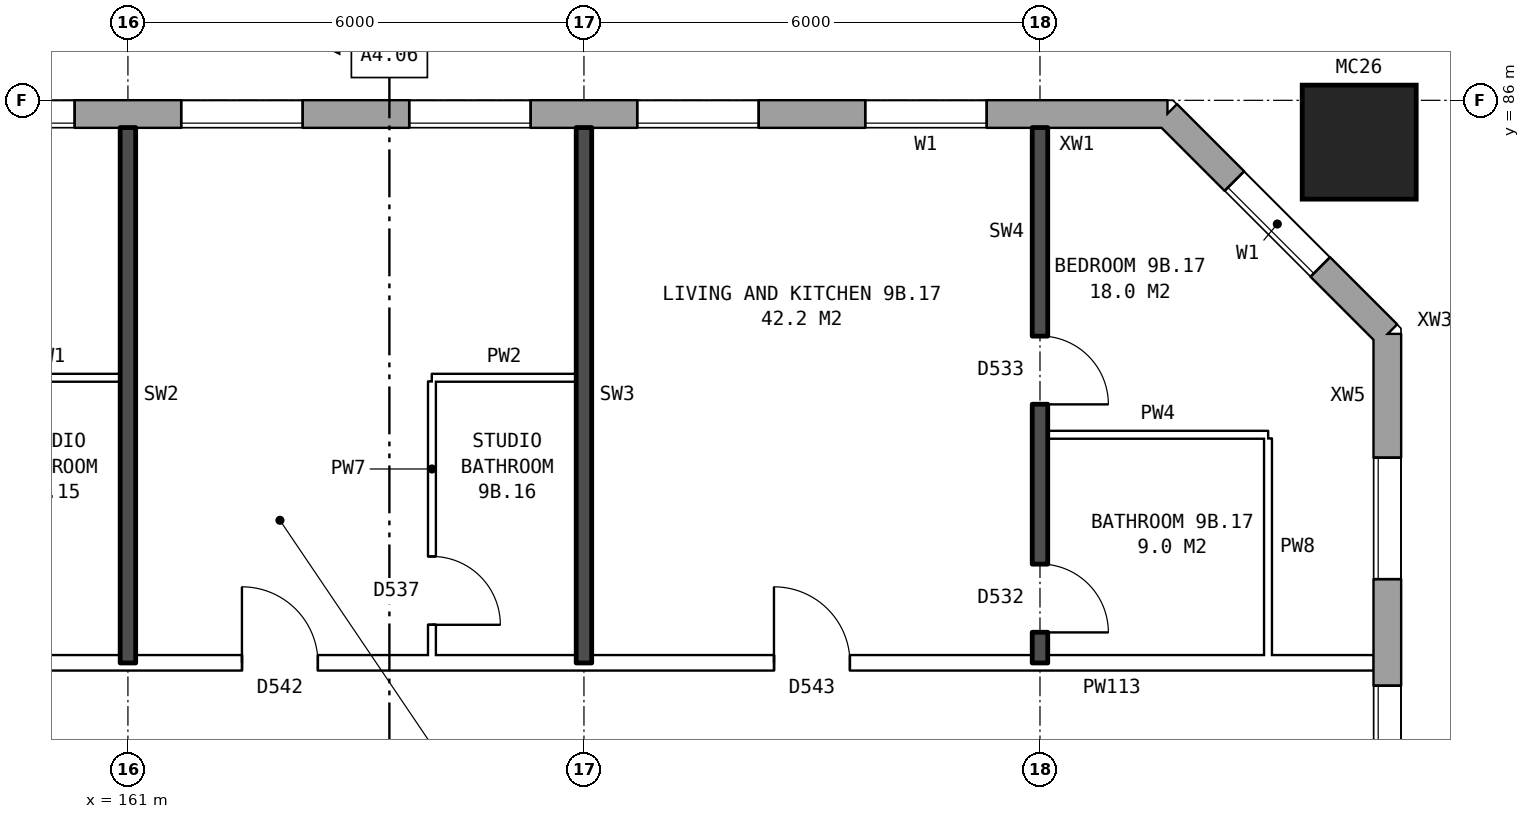
"""IFC4 building model, lengths in metres.
Left out: names, types, materials, properties, quantities, classifications, styles, units other than length and angle.
Written with IfcOpenShell. Run it as: python <this file> out.ifc"""

import sys

from ifc_helpers import new_model, si_unit, direction, frame, frame_2d, origin, origin_2d, place, context, subcontext, project, spatial, rectangle, hollow_rectangle, extrude, element, fill, save


model = new_model("IFC4")
c1 = context("Model", 3, precision=1e-05, world=origin(), true_north=direction((0.0, 1.0)))
c2 = subcontext(c1, "Body", "Model", "MODEL_VIEW")
j1 = project(units=[si_unit("LENGTHUNIT", "METRE"), si_unit("PLANEANGLEUNIT", "RADIAN")], contexts=[c1])
p1 = place(None, origin())
s1 = spatial("IfcSite", under=j1, at=p1, CompositionType="ELEMENT")
p2 = place(p1, origin())
s2 = spatial("IfcBuilding", under=s1, at=p2, CompositionType="ELEMENT")
p3 = place(p2, frame((0.0, 0.0, 35.0)))
s3 = spatial("IfcBuildingStorey", under=s2, at=p3, CompositionType="ELEMENT", Elevation=35.0)
p4 = place(p3, frame((177.2, 85.45, 0.0), z_axis=(0.0, 0.0, 1.0), x_axis=(1.0, 0.0, 0.0)))
e1 = element("IfcColumn", 1, at=p4, inside=s3, PredefinedType="COLUMN", context=c2, shape_type="SweptSolid", body=[
    extrude(hollow_rectangle(XDim=1.5, YDim=1.5, WallThickness=0.08, at=origin_2d()), origin(), (0.0, 0.0, 1.0), 3.1),
])
p5 = place(p3, frame((177.57, 57.075, 0.0), z_axis=(0.0, 0.0, 1.0), x_axis=(0.0, 1.0, 0.0)))
e2 = element("IfcWall", 2, at=p5, inside=s3, PredefinedType="STANDARD", context=c2, shape_type="SweptSolid", body=[
    extrude(rectangle(XDim=25.851, YDim=0.36, at=frame_2d((12.925, 0.0))), origin(), (0.0, 0.0, 1.0), 2.85),
])
p6 = place(p5, frame((1.625, 0.0, 0.8)))
e3 = element("IfcOpeningElement", 3, at=p6, cuts=e2, PredefinedType="OPENING", context=c2, shape_type="SweptSolid", body=[
    extrude(rectangle(XDim=1.6, YDim=1.8, at=frame_2d((0.8, 0.9))), frame((0.0, 0.19, 0.0), z_axis=(0.0, -1.0, 0.0), x_axis=(1.0, 0.0, 0.0)), (0.0, 0.0, 1.0), 0.38),
])
p7 = place(p5, frame((4.625, 0.0, 0.8)))
e4 = element("IfcOpeningElement", 4, at=p7, cuts=e2, PredefinedType="OPENING", context=c2, shape_type="SweptSolid", body=[
    extrude(rectangle(XDim=1.6, YDim=1.8, at=frame_2d((0.8, 0.9))), frame((0.0, 0.19, 0.0), z_axis=(0.0, -1.0, 0.0), x_axis=(1.0, 0.0, 0.0)), (0.0, 0.0, 1.0), 0.38),
])
p8 = place(p5, frame((7.625, 0.0, 0.8)))
e5 = element("IfcOpeningElement", 5, at=p8, cuts=e2, PredefinedType="OPENING", context=c2, shape_type="SweptSolid", body=[
    extrude(rectangle(XDim=1.6, YDim=1.8, at=frame_2d((0.8, 0.9))), frame((0.0, 0.19, 0.0), z_axis=(0.0, -1.0, 0.0), x_axis=(1.0, 0.0, 0.0)), (0.0, 0.0, 1.0), 0.38),
])
p9 = place(p5, frame((10.625, 0.0, 0.8)))
e6 = element("IfcOpeningElement", 6, at=p9, cuts=e2, PredefinedType="OPENING", context=c2, shape_type="SweptSolid", body=[
    extrude(rectangle(XDim=1.6, YDim=1.8, at=frame_2d((0.8, 0.9))), frame((0.0, 0.19, 0.0), z_axis=(0.0, -1.0, 0.0), x_axis=(1.0, 0.0, 0.0)), (0.0, 0.0, 1.0), 0.38),
])
p10 = place(p5, frame((13.625, 0.0, 0.8)))
e7 = element("IfcOpeningElement", 7, at=p10, cuts=e2, PredefinedType="OPENING", context=c2, shape_type="SweptSolid", body=[
    extrude(rectangle(XDim=1.6, YDim=1.8, at=frame_2d((0.8, 0.9))), frame((0.0, 0.19, 0.0), z_axis=(0.0, -1.0, 0.0), x_axis=(1.0, 0.0, 0.0)), (0.0, 0.0, 1.0), 0.38),
])
p11 = place(p5, frame((16.625, 0.0, 0.8)))
e8 = element("IfcOpeningElement", 8, at=p11, cuts=e2, PredefinedType="OPENING", context=c2, shape_type="SweptSolid", body=[
    extrude(rectangle(XDim=1.6, YDim=1.8, at=frame_2d((0.8, 0.9))), frame((0.0, 0.19, 0.0), z_axis=(0.0, -1.0, 0.0), x_axis=(1.0, 0.0, 0.0)), (0.0, 0.0, 1.0), 0.38),
])
p12 = place(p5, frame((19.625, 0.0, 0.8)))
e9 = element("IfcOpeningElement", 9, at=p12, cuts=e2, PredefinedType="OPENING", context=c2, shape_type="SweptSolid", body=[
    extrude(rectangle(XDim=1.6, YDim=1.8, at=frame_2d((0.8, 0.9))), frame((0.0, 0.19, 0.0), z_axis=(0.0, -1.0, 0.0), x_axis=(1.0, 0.0, 0.0)), (0.0, 0.0, 1.0), 0.38),
])
p13 = place(p5, frame((22.625, 0.0, 0.8)))
e10 = element("IfcOpeningElement", 10, at=p13, cuts=e2, PredefinedType="OPENING", context=c2, shape_type="SweptSolid", body=[
    extrude(rectangle(XDim=1.6, YDim=1.8, at=frame_2d((0.8, 0.9))), frame((0.0, 0.19, 0.0), z_axis=(0.0, -1.0, 0.0), x_axis=(1.0, 0.0, 0.0)), (0.0, 0.0, 1.0), 0.38),
])
p14 = place(p3, frame((177.57, 82.925, 0.0), z_axis=(0.0, 0.0, 1.0), x_axis=(-0.707106781187, 0.707106781187, 0.0)))
e11 = element("IfcWall", 11, at=p14, inside=s3, PredefinedType="STANDARD", context=c2, shape_type="SweptSolid", body=[
    extrude(rectangle(XDim=4.094, YDim=0.36, at=frame_2d((2.047, 0.0))), origin(), (0.0, 0.0, 1.0), 2.85),
])
p15 = place(p14, frame((1.247, 0.0, 0.8)))
e12 = element("IfcOpeningElement", 12, at=p15, cuts=e11, PredefinedType="OPENING", context=c2, shape_type="SweptSolid", body=[
    extrude(rectangle(XDim=1.6, YDim=1.8, at=frame_2d((0.8, 0.9))), frame((0.0, 0.19, 0.0), z_axis=(0.0, -1.0, 0.0), x_axis=(1.0, 0.0, 0.0)), (0.0, 0.0, 1.0), 0.38),
])
p16 = place(p3, frame((174.675, 85.82, 0.0), z_axis=(0.0, 0.0, 1.0), x_axis=(-1.0, 0.0, 0.0)))
e13 = element("IfcWall", 13, at=p16, inside=s3, PredefinedType="STANDARD", context=c2, shape_type="SweptSolid", body=[
    extrude(rectangle(XDim=40.601, YDim=0.36, at=frame_2d((20.3, 0.0))), origin(), (0.0, 0.0, 1.0), 2.85),
])
p17 = place(p16, frame((2.375, 0.0, 0.8)))
e14 = element("IfcOpeningElement", 14, at=p17, cuts=e13, PredefinedType="OPENING", context=c2, shape_type="SweptSolid", body=[
    extrude(rectangle(XDim=1.6, YDim=1.8, at=frame_2d((0.8, 0.9))), frame((0.0, 0.19, 0.0), z_axis=(0.0, -1.0, 0.0), x_axis=(1.0, 0.0, 0.0)), (0.0, 0.0, 1.0), 0.38),
])
p18 = place(p16, frame((5.375, 0.0, 0.8)))
e15 = element("IfcOpeningElement", 15, at=p18, cuts=e13, PredefinedType="OPENING", context=c2, shape_type="SweptSolid", body=[
    extrude(rectangle(XDim=1.6, YDim=1.8, at=frame_2d((0.8, 0.9))), frame((0.0, 0.19, 0.0), z_axis=(0.0, -1.0, 0.0), x_axis=(1.0, 0.0, 0.0)), (0.0, 0.0, 1.0), 0.38),
])
p19 = place(p16, frame((8.375, 0.0, 0.8)))
e16 = element("IfcOpeningElement", 16, at=p19, cuts=e13, PredefinedType="OPENING", context=c2, shape_type="SweptSolid", body=[
    extrude(rectangle(XDim=1.6, YDim=1.8, at=frame_2d((0.8, 0.9))), frame((0.0, 0.19, 0.0), z_axis=(0.0, -1.0, 0.0), x_axis=(1.0, 0.0, 0.0)), (0.0, 0.0, 1.0), 0.38),
])
p20 = place(p16, frame((11.375, 0.0, 0.8)))
e17 = element("IfcOpeningElement", 17, at=p20, cuts=e13, PredefinedType="OPENING", context=c2, shape_type="SweptSolid", body=[
    extrude(rectangle(XDim=1.6, YDim=1.8, at=frame_2d((0.8, 0.9))), frame((0.0, 0.19, 0.0), z_axis=(0.0, -1.0, 0.0), x_axis=(1.0, 0.0, 0.0)), (0.0, 0.0, 1.0), 0.38),
])
p21 = place(p16, frame((14.375, 0.0, 0.8)))
e18 = element("IfcOpeningElement", 18, at=p21, cuts=e13, PredefinedType="OPENING", context=c2, shape_type="SweptSolid", body=[
    extrude(rectangle(XDim=1.6, YDim=1.8, at=frame_2d((0.8, 0.9))), frame((0.0, 0.19, 0.0), z_axis=(0.0, -1.0, 0.0), x_axis=(1.0, 0.0, 0.0)), (0.0, 0.0, 1.0), 0.38),
])
p22 = place(p16, frame((16.275, 0.0, 0.8)))
e19 = element("IfcOpeningElement", 19, at=p22, cuts=e13, PredefinedType="OPENING", context=c2, shape_type="SweptSolid", body=[
    extrude(rectangle(XDim=1.0, YDim=1.8, at=frame_2d((0.5, 0.9))), frame((0.0, 0.19, 0.0), z_axis=(0.0, -1.0, 0.0), x_axis=(1.0, 0.0, 0.0)), (0.0, 0.0, 1.0), 0.38),
])
p23 = place(p16, frame((19.975, 0.0, 0.15)))
e20 = element("IfcOpeningElement", 20, at=p23, cuts=e13, PredefinedType="OPENING", context=c2, shape_type="SweptSolid", body=[
    extrude(rectangle(XDim=0.6, YDim=1.8, at=frame_2d((0.3, 0.9))), frame((0.0, 0.19, 0.0), z_axis=(0.0, -1.0, 0.0), x_axis=(1.0, 0.0, 0.0)), (0.0, 0.0, 1.0), 0.38),
])
p24 = place(p16, frame((23.375, 0.0, 0.8)))
e21 = element("IfcOpeningElement", 21, at=p24, cuts=e13, PredefinedType="OPENING", context=c2, shape_type="SweptSolid", body=[
    extrude(rectangle(XDim=1.6, YDim=1.8, at=frame_2d((0.8, 0.9))), frame((0.0, 0.19, 0.0), z_axis=(0.0, -1.0, 0.0), x_axis=(1.0, 0.0, 0.0)), (0.0, 0.0, 1.0), 0.38),
])
p25 = place(p16, frame((26.375, 0.0, 0.8)))
e22 = element("IfcOpeningElement", 22, at=p25, cuts=e13, PredefinedType="OPENING", context=c2, shape_type="SweptSolid", body=[
    extrude(rectangle(XDim=1.6, YDim=1.8, at=frame_2d((0.8, 0.9))), frame((0.0, 0.19, 0.0), z_axis=(0.0, -1.0, 0.0), x_axis=(1.0, 0.0, 0.0)), (0.0, 0.0, 1.0), 0.38),
])
p26 = place(p16, frame((29.375, 0.0, 0.8)))
e23 = element("IfcOpeningElement", 23, at=p26, cuts=e13, PredefinedType="OPENING", context=c2, shape_type="SweptSolid", body=[
    extrude(rectangle(XDim=1.6, YDim=1.8, at=frame_2d((0.8, 0.9))), frame((0.0, 0.19, 0.0), z_axis=(0.0, -1.0, 0.0), x_axis=(1.0, 0.0, 0.0)), (0.0, 0.0, 1.0), 0.38),
])
p27 = place(p16, frame((32.375, 0.0, 0.8)))
e24 = element("IfcOpeningElement", 24, at=p27, cuts=e13, PredefinedType="OPENING", context=c2, shape_type="SweptSolid", body=[
    extrude(rectangle(XDim=1.6, YDim=1.8, at=frame_2d((0.8, 0.9))), frame((0.0, 0.19, 0.0), z_axis=(0.0, -1.0, 0.0), x_axis=(1.0, 0.0, 0.0)), (0.0, 0.0, 1.0), 0.38),
])
p28 = place(p16, frame((35.375, 0.0, 0.8)))
e25 = element("IfcOpeningElement", 25, at=p28, cuts=e13, PredefinedType="OPENING", context=c2, shape_type="SweptSolid", body=[
    extrude(rectangle(XDim=1.6, YDim=1.8, at=frame_2d((0.8, 0.9))), frame((0.0, 0.19, 0.0), z_axis=(0.0, -1.0, 0.0), x_axis=(1.0, 0.0, 0.0)), (0.0, 0.0, 1.0), 0.38),
])
p29 = place(p16, frame((38.375, 0.0, 0.8)))
e26 = element("IfcOpeningElement", 26, at=p29, cuts=e13, PredefinedType="OPENING", context=c2, shape_type="SweptSolid", body=[
    extrude(rectangle(XDim=1.6, YDim=1.8, at=frame_2d((0.8, 0.9))), frame((0.0, 0.19, 0.0), z_axis=(0.0, -1.0, 0.0), x_axis=(1.0, 0.0, 0.0)), (0.0, 0.0, 1.0), 0.38),
])
p30 = place(p16, frame((17.575, 0.0, 1.7)))
e27 = element("IfcOpeningElement", 27, at=p30, cuts=e13, PredefinedType="OPENING", context=c2, shape_type="SweptSolid", body=[
    extrude(rectangle(XDim=0.8, YDim=0.9, at=frame_2d((0.4, 0.45))), frame((0.0, 0.19, 0.0), z_axis=(0.0, -1.0, 0.0), x_axis=(1.0, 0.0, 0.0)), (0.0, 0.0, 1.0), 0.38),
])
p31 = place(p16, frame((20.875, 0.0, 0.15)))
e28 = element("IfcOpeningElement", 28, at=p31, cuts=e13, PredefinedType="OPENING", context=c2, shape_type="SweptSolid", body=[
    extrude(rectangle(XDim=0.8, YDim=0.9, at=frame_2d((0.4, 0.45))), frame((0.0, 0.19, 0.0), z_axis=(0.0, -1.0, 0.0), x_axis=(1.0, 0.0, 0.0)), (0.0, 0.0, 1.0), 0.38),
])
p32 = place(p3, frame((155.1, 78.6, 0.0), z_axis=(0.0, 0.0, 1.0), x_axis=(1.0, 0.0, 0.0)))
e29 = element("IfcWall", 29, at=p32, inside=s3, PredefinedType="PARTITIONING", context=c2, shape_type="SweptSolid", body=[
    extrude(rectangle(XDim=22.29, YDim=0.2, at=frame_2d((11.145, 0.0))), origin(), (0.0, 0.0, 1.0), 2.85),
])
p33 = place(p32, frame((1.45, 0.0, 0.0)))
e30 = element("IfcOpeningElement", 30, at=p33, cuts=e29, PredefinedType="OPENING", context=c2, shape_type="SweptSolid", body=[
    extrude(rectangle(XDim=1.0, YDim=2.1, at=frame_2d((0.5, 1.05))), frame((0.0, 0.11, 0.0), z_axis=(0.0, -1.0, 0.0), x_axis=(1.0, 0.0, 0.0)), (0.0, 0.0, 1.0), 0.22),
])
p34 = place(p32, frame((7.4, 0.0, 0.0)))
e31 = element("IfcOpeningElement", 31, at=p34, cuts=e29, PredefinedType="OPENING", context=c2, shape_type="SweptSolid", body=[
    extrude(rectangle(XDim=1.0, YDim=2.1, at=frame_2d((0.5, 1.05))), frame((0.0, 0.11, 0.0), z_axis=(0.0, -1.0, 0.0), x_axis=(1.0, 0.0, 0.0)), (0.0, 0.0, 1.0), 0.22),
])
p35 = place(p32, frame((14.4, 0.0, 0.0)))
e32 = element("IfcOpeningElement", 32, at=p35, cuts=e29, PredefinedType="OPENING", context=c2, shape_type="SweptSolid", body=[
    extrude(rectangle(XDim=1.0, YDim=2.1, at=frame_2d((0.5, 1.05))), frame((0.0, 0.11, 0.0), z_axis=(0.0, -1.0, 0.0), x_axis=(1.0, 0.0, 0.0)), (0.0, 0.0, 1.0), 0.22),
])
p36 = place(p3, frame((173.1, 81.6, 0.0), z_axis=(0.0, 0.0, 1.0), x_axis=(1.0, 0.0, 0.0)))
e33 = element("IfcWall", 33, at=p36, inside=s3, PredefinedType="PARTITIONING", context=c2, shape_type="SweptSolid", body=[
    extrude(rectangle(XDim=2.9, YDim=0.1, at=frame_2d((1.45, 0.0))), origin(), (0.0, 0.0, 1.0), 2.85),
])
for number, where, z_axis, x_axis in (
    (34, (159.0, 82.35, 0.0), (0.0, 0.0, 1.0), (1.0, 0.0, 0.0)),
    (35, (165.0, 82.35, 0.0), (0.0, 0.0, 1.0), (1.0, 0.0, 0.0)),
):
    element("IfcWall", number, at=place(p3, frame(where, z_axis=z_axis, x_axis=x_axis)), inside=s3, PredefinedType="PARTITIONING", context=c2, shape_type="SweptSolid", body=[
        extrude(rectangle(XDim=1.9, YDim=0.1, at=frame_2d((0.95, 0.0))), origin(), (0.0, 0.0, 1.0), 2.85),
    ])
p37 = place(p3, frame((161.0, 78.6, 0.0), z_axis=(0.0, 0.0, 1.0), x_axis=(0.0, 1.0, 0.0)))
e36 = element("IfcWall", 36, at=p37, inside=s3, PredefinedType="SOLIDWALL", context=c2, shape_type="SweptSolid", body=[
    extrude(rectangle(XDim=7.04, YDim=0.2, at=frame_2d((3.52, 0.0))), origin(), (0.0, 0.0, 1.0), 2.85),
])
p38 = place(p3, frame((165.0, 78.7, 0.0), z_axis=(0.0, 0.0, 1.0), x_axis=(0.0, 1.0, 0.0)))
e37 = element("IfcWall", 37, at=p38, inside=s3, PredefinedType="PARTITIONING", context=c2, shape_type="SweptSolid", body=[
    extrude(rectangle(XDim=3.6, YDim=0.1, at=frame_2d((1.8, 0.0))), origin(), (0.0, 0.0, 1.0), 2.85),
])
p39 = place(p38, frame((0.4, 0.0, 0.0)))
e38 = element("IfcOpeningElement", 38, at=p39, cuts=e37, PredefinedType="OPENING", context=c2, shape_type="SweptSolid", body=[
    extrude(rectangle(XDim=0.9, YDim=2.1, at=frame_2d((0.45, 1.05))), frame((0.0, 0.06, 0.0), z_axis=(0.0, -1.0, 0.0), x_axis=(1.0, 0.0, 0.0)), (0.0, 0.0, 1.0), 0.12),
])
p40 = place(p3, frame((167.0, 78.6, 0.0), z_axis=(0.0, 0.0, 1.0), x_axis=(0.0, 1.0, 0.0)))
e39 = element("IfcWall", 39, at=p40, inside=s3, PredefinedType="SOLIDWALL", context=c2, shape_type="SweptSolid", body=[
    extrude(rectangle(XDim=7.04, YDim=0.2, at=frame_2d((3.52, 0.0))), origin(), (0.0, 0.0, 1.0), 2.85),
])
p41 = place(p3, frame((173.0, 78.6, 0.0), z_axis=(0.0, 0.0, 1.0), x_axis=(0.0, 1.0, 0.0)))
e40 = element("IfcWall", 40, at=p41, inside=s3, PredefinedType="SOLIDWALL", context=c2, shape_type="SweptSolid", body=[
    extrude(rectangle(XDim=7.04, YDim=0.2, at=frame_2d((3.52, 0.0))), origin(), (0.0, 0.0, 1.0), 2.85),
])
p42 = place(p41, frame((3.4, 0.0, 0.0)))
e41 = element("IfcOpeningElement", 41, at=p42, cuts=e40, PredefinedType="OPENING", context=c2, shape_type="SweptSolid", body=[
    extrude(rectangle(XDim=0.9, YDim=2.1, at=frame_2d((0.45, 1.05))), frame((0.0, 0.11, 0.0), z_axis=(0.0, -1.0, 0.0), x_axis=(1.0, 0.0, 0.0)), (0.0, 0.0, 1.0), 0.22),
])
p43 = place(p41, frame((0.4, 0.0, 0.0)))
e42 = element("IfcOpeningElement", 42, at=p43, cuts=e40, PredefinedType="OPENING", context=c2, shape_type="SweptSolid", body=[
    extrude(rectangle(XDim=0.9, YDim=2.1, at=frame_2d((0.45, 1.05))), frame((0.0, 0.11, 0.0), z_axis=(0.0, -1.0, 0.0), x_axis=(1.0, 0.0, 0.0)), (0.0, 0.0, 1.0), 0.22),
])
p44 = place(p3, frame((176.0, 78.7, 0.0), z_axis=(0.0, 0.0, 1.0), x_axis=(0.0, 1.0, 0.0)))
e43 = element("IfcWall", 43, at=p44, inside=s3, PredefinedType="PARTITIONING", context=c2, shape_type="SweptSolid", body=[
    extrude(rectangle(XDim=2.85, YDim=0.1, at=frame_2d((1.425, 0.0))), origin(), (0.0, 0.0, 1.0), 2.85),
])
p45 = place(p12, origin())
e44 = element("IfcWindow", 44, at=p45, inside=s3, PartitioningType="SINGLE_PANEL", PredefinedType="WINDOW", context=c2, shape_type="SweptSolid", body=[
    extrude(rectangle(XDim=1.6, YDim=1.8, at=frame_2d((0.8, 0.9))), frame((0.0, 0.15, 0.0), z_axis=(0.0, -1.0, 0.0), x_axis=(1.0, 0.0, 0.0)), (0.0, 0.0, 1.0), 0.06),
])
fill(e9, e44)
p46 = place(p13, origin())
e45 = element("IfcWindow", 45, at=p46, inside=s3, PartitioningType="SINGLE_PANEL", PredefinedType="WINDOW", context=c2, shape_type="SweptSolid", body=[
    extrude(rectangle(XDim=1.6, YDim=1.8, at=frame_2d((0.8, 0.9))), frame((0.0, 0.15, 0.0), z_axis=(0.0, -1.0, 0.0), x_axis=(1.0, 0.0, 0.0)), (0.0, 0.0, 1.0), 0.06),
])
fill(e10, e45)
p47 = place(p15, origin())
e46 = element("IfcWindow", 46, at=p47, inside=s3, PartitioningType="SINGLE_PANEL", PredefinedType="WINDOW", context=c2, shape_type="SweptSolid", body=[
    extrude(rectangle(XDim=1.6, YDim=1.8, at=frame_2d((0.8, 0.9))), frame((0.0, 0.15, 0.0), z_axis=(0.0, -1.0, 0.0), x_axis=(1.0, 0.0, 0.0)), (0.0, 0.0, 1.0), 0.06),
])
fill(e12, e46)
p48 = place(p17, origin())
e47 = element("IfcWindow", 47, at=p48, inside=s3, PartitioningType="SINGLE_PANEL", PredefinedType="WINDOW", context=c2, shape_type="SweptSolid", body=[
    extrude(rectangle(XDim=1.6, YDim=1.8, at=frame_2d((0.8, 0.9))), frame((0.0, 0.15, 0.0), z_axis=(0.0, -1.0, 0.0), x_axis=(1.0, 0.0, 0.0)), (0.0, 0.0, 1.0), 0.06),
])
fill(e14, e47)
p49 = place(p18, origin())
e48 = element("IfcWindow", 48, at=p49, inside=s3, PartitioningType="SINGLE_PANEL", PredefinedType="WINDOW", context=c2, shape_type="SweptSolid", body=[
    extrude(rectangle(XDim=1.6, YDim=1.8, at=frame_2d((0.8, 0.9))), frame((0.0, 0.15, 0.0), z_axis=(0.0, -1.0, 0.0), x_axis=(1.0, 0.0, 0.0)), (0.0, 0.0, 1.0), 0.06),
])
fill(e15, e48)
p50 = place(p19, origin())
e49 = element("IfcWindow", 49, at=p50, inside=s3, PartitioningType="SINGLE_PANEL", PredefinedType="WINDOW", context=c2, shape_type="SweptSolid", body=[
    extrude(rectangle(XDim=1.6, YDim=1.8, at=frame_2d((0.8, 0.9))), frame((0.0, 0.15, 0.0), z_axis=(0.0, -1.0, 0.0), x_axis=(1.0, 0.0, 0.0)), (0.0, 0.0, 1.0), 0.06),
])
fill(e16, e49)
p51 = place(p20, origin())
e50 = element("IfcWindow", 50, at=p51, inside=s3, PartitioningType="SINGLE_PANEL", PredefinedType="WINDOW", context=c2, shape_type="SweptSolid", body=[
    extrude(rectangle(XDim=1.6, YDim=1.8, at=frame_2d((0.8, 0.9))), frame((0.0, 0.15, 0.0), z_axis=(0.0, -1.0, 0.0), x_axis=(1.0, 0.0, 0.0)), (0.0, 0.0, 1.0), 0.06),
])
fill(e17, e50)
p52 = place(p21, origin())
e51 = element("IfcWindow", 51, at=p52, inside=s3, PartitioningType="SINGLE_PANEL", PredefinedType="WINDOW", context=c2, shape_type="SweptSolid", body=[
    extrude(rectangle(XDim=1.6, YDim=1.8, at=frame_2d((0.8, 0.9))), frame((0.0, 0.15, 0.0), z_axis=(0.0, -1.0, 0.0), x_axis=(1.0, 0.0, 0.0)), (0.0, 0.0, 1.0), 0.06),
])
fill(e18, e51)
p53 = place(p34, origin())
e52 = element("IfcDoor", 52, at=p53, inside=s3, OperationType="SINGLE_SWING_LEFT", PredefinedType="DOOR", context=c2, shape_type="SweptSolid", body=[
    extrude(rectangle(XDim=1.0, YDim=2.1, at=frame_2d((0.5, 1.05))), frame((0.0, 0.025, 0.0), z_axis=(0.0, -1.0, 0.0), x_axis=(1.0, 0.0, 0.0)), (0.0, 0.0, 1.0), 0.05),
])
fill(e31, e52)
p54 = place(p39, frame((0.9, 0.0, 0.0), z_axis=(0.0, 0.0, 1.0), x_axis=(-1.0, 0.0, 0.0)))
e53 = element("IfcDoor", 53, at=p54, inside=s3, OperationType="SINGLE_SWING_RIGHT", PredefinedType="DOOR", context=c2, shape_type="SweptSolid", body=[
    extrude(rectangle(XDim=0.9, YDim=2.1, at=frame_2d((0.45, 1.05))), frame((0.0, 0.025, 0.0), z_axis=(0.0, -1.0, 0.0), x_axis=(1.0, 0.0, 0.0)), (0.0, 0.0, 1.0), 0.05),
])
fill(e38, e53)
p55 = place(p42, frame((0.9, 0.0, 0.0), z_axis=(0.0, 0.0, 1.0), x_axis=(-1.0, 0.0, 0.0)))
e54 = element("IfcDoor", 54, at=p55, inside=s3, OperationType="SINGLE_SWING_RIGHT", PredefinedType="DOOR", context=c2, shape_type="SweptSolid", body=[
    extrude(rectangle(XDim=0.9, YDim=2.1, at=frame_2d((0.45, 1.05))), frame((0.0, 0.025, 0.0), z_axis=(0.0, -1.0, 0.0), x_axis=(1.0, 0.0, 0.0)), (0.0, 0.0, 1.0), 0.05),
])
fill(e41, e54)
p56 = place(p35, origin())
e55 = element("IfcDoor", 55, at=p56, inside=s3, OperationType="SINGLE_SWING_LEFT", PredefinedType="DOOR", context=c2, shape_type="SweptSolid", body=[
    extrude(rectangle(XDim=1.0, YDim=2.1, at=frame_2d((0.5, 1.05))), frame((0.0, 0.025, 0.0), z_axis=(0.0, -1.0, 0.0), x_axis=(1.0, 0.0, 0.0)), (0.0, 0.0, 1.0), 0.05),
])
fill(e32, e55)
p57 = place(p43, frame((0.9, 0.0, 0.0), z_axis=(0.0, 0.0, 1.0), x_axis=(-1.0, 0.0, 0.0)))
e56 = element("IfcDoor", 56, at=p57, inside=s3, OperationType="SINGLE_SWING_RIGHT", PredefinedType="DOOR", context=c2, shape_type="SweptSolid", body=[
    extrude(rectangle(XDim=0.9, YDim=2.1, at=frame_2d((0.45, 1.05))), frame((0.0, 0.025, 0.0), z_axis=(0.0, -1.0, 0.0), x_axis=(1.0, 0.0, 0.0)), (0.0, 0.0, 1.0), 0.05),
])
fill(e42, e56)
save(model, sys.argv[1])
